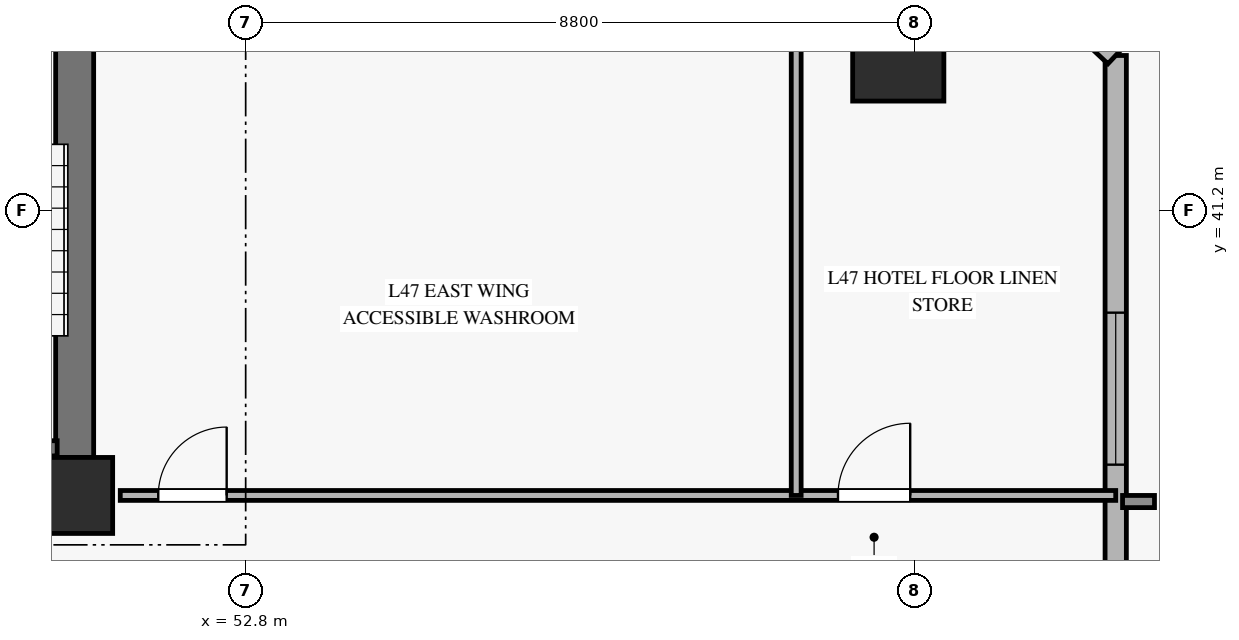
"""IFC4 building model, lengths in metres.
Left out: names, types, materials, properties, quantities, classifications, styles, units other than length and angle.
Written with IfcOpenShell. Run it as: python <this file> out.ifc"""

import sys

from ifc_helpers import new_model, si_unit, direction, frame, frame_2d, origin, origin_2d, place, context, subcontext, project, spatial, rectangle, hollow_rectangle, extrude, source, transform, mapped, element, fill, save


model = new_model("IFC4")
c1 = context("Model", 3, precision=1e-05, world=origin(), true_north=direction((0.0, 1.0)))
c2 = subcontext(c1, "Body", "Model", "MODEL_VIEW")
j1 = project(units=[si_unit("LENGTHUNIT", "METRE"), si_unit("PLANEANGLEUNIT", "RADIAN")], contexts=[c1])
p1 = place(None, origin())
s1 = spatial("IfcSite", under=j1, at=p1, CompositionType="ELEMENT")
p2 = place(p1, origin())
s2 = spatial("IfcBuilding", under=s1, at=p2, CompositionType="ELEMENT")
p3 = place(p2, frame((0.0, 0.0, 187.7)))
s3 = spatial("IfcBuildingStorey", under=s2, at=p3, CompositionType="ELEMENT", Elevation=187.7)
m1 = source(origin(), c2, "Body", "SweptSolid", [
    extrude(rectangle(XDim=1.0, YDim=1.0, at=origin_2d()), origin(), (0.0, 0.0, 1.0), 3.22),
])
p4 = place(p3, frame((50.55, 37.45, 0.0), z_axis=(0.0, 0.0, 1.0), x_axis=(1.0, 0.0, 0.0)))
e1 = element("IfcColumn", 1, at=p4, inside=s3, PredefinedType="PILASTER", context=c2, shape_type="MappedRepresentation", body=[
    mapped(m1, transform((0.0, 0.0, 0.0), x_axis=(1.0, 0.0, 0.0), y_axis=(0.0, 1.0, 0.0), z_axis=(0.0, 0.0, 1.0), scale=1.0)),
])
p5 = place(p3, frame((50.55, 37.95, 0.0), z_axis=(0.0, 0.0, 1.0), x_axis=(0.0, 1.0, 0.0)))
e2 = element("IfcWall", 2, at=p5, inside=s3, PredefinedType="SHEAR", context=c2, shape_type="SweptSolid", body=[
    extrude(rectangle(XDim=8.1, YDim=0.5, at=frame_2d((4.05, 0.0))), origin(), (0.0, 0.0, 1.0), 3.22),
])
m2 = source(origin(), c2, "Body", "SweptSolid", [
    extrude(hollow_rectangle(XDim=1.2, YDim=1.2, WallThickness=0.055, at=origin_2d()), origin(), (0.0, 0.0, 1.0), 3.227),
])
p6 = place(p3, frame((61.386, 43.239, 0.0), z_axis=(-0.064764221844, 0.008019868593, 0.997868366708), x_axis=(-0.122893119903, -0.992419911671, 0.0)))
e3 = element("IfcColumn", 3, at=p6, inside=s3, PredefinedType="COLUMN", context=c2, shape_type="MappedRepresentation", body=[
    mapped(m2, transform((0.0, 0.0, 0.0), x_axis=(1.0, 0.0, 0.0), y_axis=(0.0, 1.0, 0.0), z_axis=(0.0, 0.0, 1.0), scale=1.0)),
])
p7 = place(p3, frame((64.247, 28.477, 0.0), z_axis=(0.0, 0.0, 1.0), x_axis=(0.0, 1.0, 0.0)))
e4 = element("IfcWall", 4, at=p7, inside=s3, PredefinedType="SOLIDWALL", context=c2, shape_type="SweptSolid", body=[
    extrude(rectangle(XDim=14.762, YDim=0.28, at=frame_2d((7.381, 0.0))), origin(), (0.0, 0.0, 1.0), 2.7),
])
p8 = place(p7, frame((9.378, 0.0, 0.45)))
e5 = element("IfcOpeningElement", 5, at=p8, cuts=e4, PredefinedType="OPENING", context=c2, shape_type="SweptSolid", body=[
    extrude(rectangle(XDim=2.0, YDim=2.0, at=frame_2d((1.0, 1.0))), frame((0.0, 0.15, 0.0), z_axis=(0.0, -1.0, 0.0), x_axis=(1.0, 0.0, 0.0)), (0.0, 0.0, 1.0), 0.3),
])
p9 = place(p3, frame((64.247, 43.239, 0.0), z_axis=(0.0, 0.0, 1.0), x_axis=(-0.729480126226, 0.684002006899, 0.0)))
e6 = element("IfcWall", 6, at=p9, inside=s3, PredefinedType="SOLIDWALL", context=c2, shape_type="SweptSolid", body=[
    extrude(rectangle(XDim=4.402, YDim=0.3, at=frame_2d((2.201, 0.0))), origin(), (0.0, 0.0, 1.0), 2.7),
])
p10 = place(p9, frame((1.401, 0.0, 0.45)))
e7 = element("IfcOpeningElement", 7, at=p10, cuts=e6, PredefinedType="OPENING", context=c2, shape_type="SweptSolid", body=[
    extrude(rectangle(XDim=1.6, YDim=2.0, at=frame_2d((0.8, 1.0))), frame((0.0, 0.16, 0.0), z_axis=(0.0, -1.0, 0.0), x_axis=(1.0, 0.0, 0.0)), (0.0, 0.0, 1.0), 0.32),
])
p11 = place(p3, frame((47.44, 38.07, 0.0), z_axis=(0.0, 0.0, 1.0), x_axis=(1.0, 0.0, 0.0)))
e8 = element("IfcWall", 8, at=p11, inside=s3, PredefinedType="SOLIDWALL", context=c2, shape_type="SweptSolid", body=[
    extrude(rectangle(XDim=2.88, YDim=0.2, at=frame_2d((1.44, 0.0))), origin(), (0.0, 0.0, 1.0), 3.5),
])
p12 = place(p3, frame((51.15, 37.45, 0.0), z_axis=(0.0, 0.0, 1.0), x_axis=(1.0, 0.0, 0.0)))
e9 = element("IfcWall", 9, at=p12, inside=s3, PredefinedType="PARTITIONING", context=c2, shape_type="SweptSolid", body=[
    extrude(rectangle(XDim=13.097, YDim=0.13, at=frame_2d((6.549, 0.0))), origin(), (0.0, 0.0, 1.0), 2.705),
])
p13 = place(p12, frame((0.5, 0.0, 0.0)))
e10 = element("IfcOpeningElement", 10, at=p13, cuts=e9, PredefinedType="OPENING", context=c2, shape_type="SweptSolid", body=[
    extrude(rectangle(XDim=0.9, YDim=2.1, at=frame_2d((0.45, 1.05))), frame((0.0, 0.075, 0.0), z_axis=(0.0, -1.0, 0.0), x_axis=(1.0, 0.0, 0.0)), (0.0, 0.0, 1.0), 0.15),
])
p14 = place(p12, frame((9.443, 0.0, 0.0)))
e11 = element("IfcOpeningElement", 11, at=p14, cuts=e9, PredefinedType="OPENING", context=c2, shape_type="SweptSolid", body=[
    extrude(rectangle(XDim=0.95, YDim=2.1, at=frame_2d((0.475, 1.05))), frame((0.0, 0.075, 0.0), z_axis=(0.0, -1.0, 0.0), x_axis=(1.0, 0.0, 0.0)), (0.0, 0.0, 1.0), 0.15),
])
p15 = place(p3, frame((60.043, 37.45, 0.0), z_axis=(0.0, 0.0, 1.0), x_axis=(0.0, 1.0, 0.0)))
e12 = element("IfcWall", 12, at=p15, inside=s3, PredefinedType="PARTITIONING", context=c2, shape_type="SweptSolid", body=[
    extrude(rectangle(XDim=8.8, YDim=0.13, at=frame_2d((4.4, 0.0))), origin(), (0.0, 0.0, 1.0), 2.705),
])
m3 = source(origin(), c2, "Body", "SweptSolid", [
    extrude(rectangle(XDim=2.0, YDim=2.0, at=frame_2d((1.0, 1.0))), frame((0.0, 0.03, 0.0), z_axis=(0.0, -1.0, 0.0), x_axis=(1.0, 0.0, 0.0)), (0.0, 0.0, 1.0), 0.06),
])
p16 = place(p8, origin())
e13 = element("IfcWindow", 13, at=p16, inside=s3, PartitioningType="SINGLE_PANEL", PredefinedType="WINDOW", context=c2, shape_type="MappedRepresentation", body=[
    mapped(m3, transform((0.0, 0.0, 0.0), x_axis=(1.0, 0.0, 0.0), y_axis=(0.0, 1.0, 0.0), z_axis=(0.0, 0.0, 1.0), scale=1.0)),
])
fill(e5, e13)
m4 = source(origin(), c2, "Body", "SweptSolid", [
    extrude(rectangle(XDim=0.9, YDim=2.1, at=frame_2d((0.45, 1.05))), frame((0.0, 0.025, 0.0), z_axis=(0.0, -1.0, 0.0), x_axis=(1.0, 0.0, 0.0)), (0.0, 0.0, 1.0), 0.05),
])
p17 = place(p13, origin())
e14 = element("IfcDoor", 14, at=p17, inside=s3, OperationType="SINGLE_SWING_RIGHT", PredefinedType="DOOR", context=c2, shape_type="MappedRepresentation", body=[
    mapped(m4, transform((0.0, 0.0, 0.0), x_axis=(1.0, 0.0, 0.0), y_axis=(0.0, 1.0, 0.0), z_axis=(0.0, 0.0, 1.0), scale=1.0)),
])
fill(e10, e14)
m5 = source(origin(), c2, "Body", "SweptSolid", [
    extrude(rectangle(XDim=0.95, YDim=2.1, at=frame_2d((0.475, 1.05))), frame((0.0, 0.025, 0.0), z_axis=(0.0, -1.0, 0.0), x_axis=(1.0, 0.0, 0.0)), (0.0, 0.0, 1.0), 0.05),
])
p18 = place(p14, origin())
e15 = element("IfcDoor", 15, at=p18, inside=s3, OperationType="SINGLE_SWING_RIGHT", PredefinedType="DOOR", context=c2, shape_type="MappedRepresentation", body=[
    mapped(m5, transform((0.0, 0.0, 0.0), x_axis=(1.0, 0.0, 0.0), y_axis=(0.0, 1.0, 0.0), z_axis=(0.0, 0.0, 1.0), scale=1.0)),
])
fill(e11, e15)
save(model, sys.argv[1])
